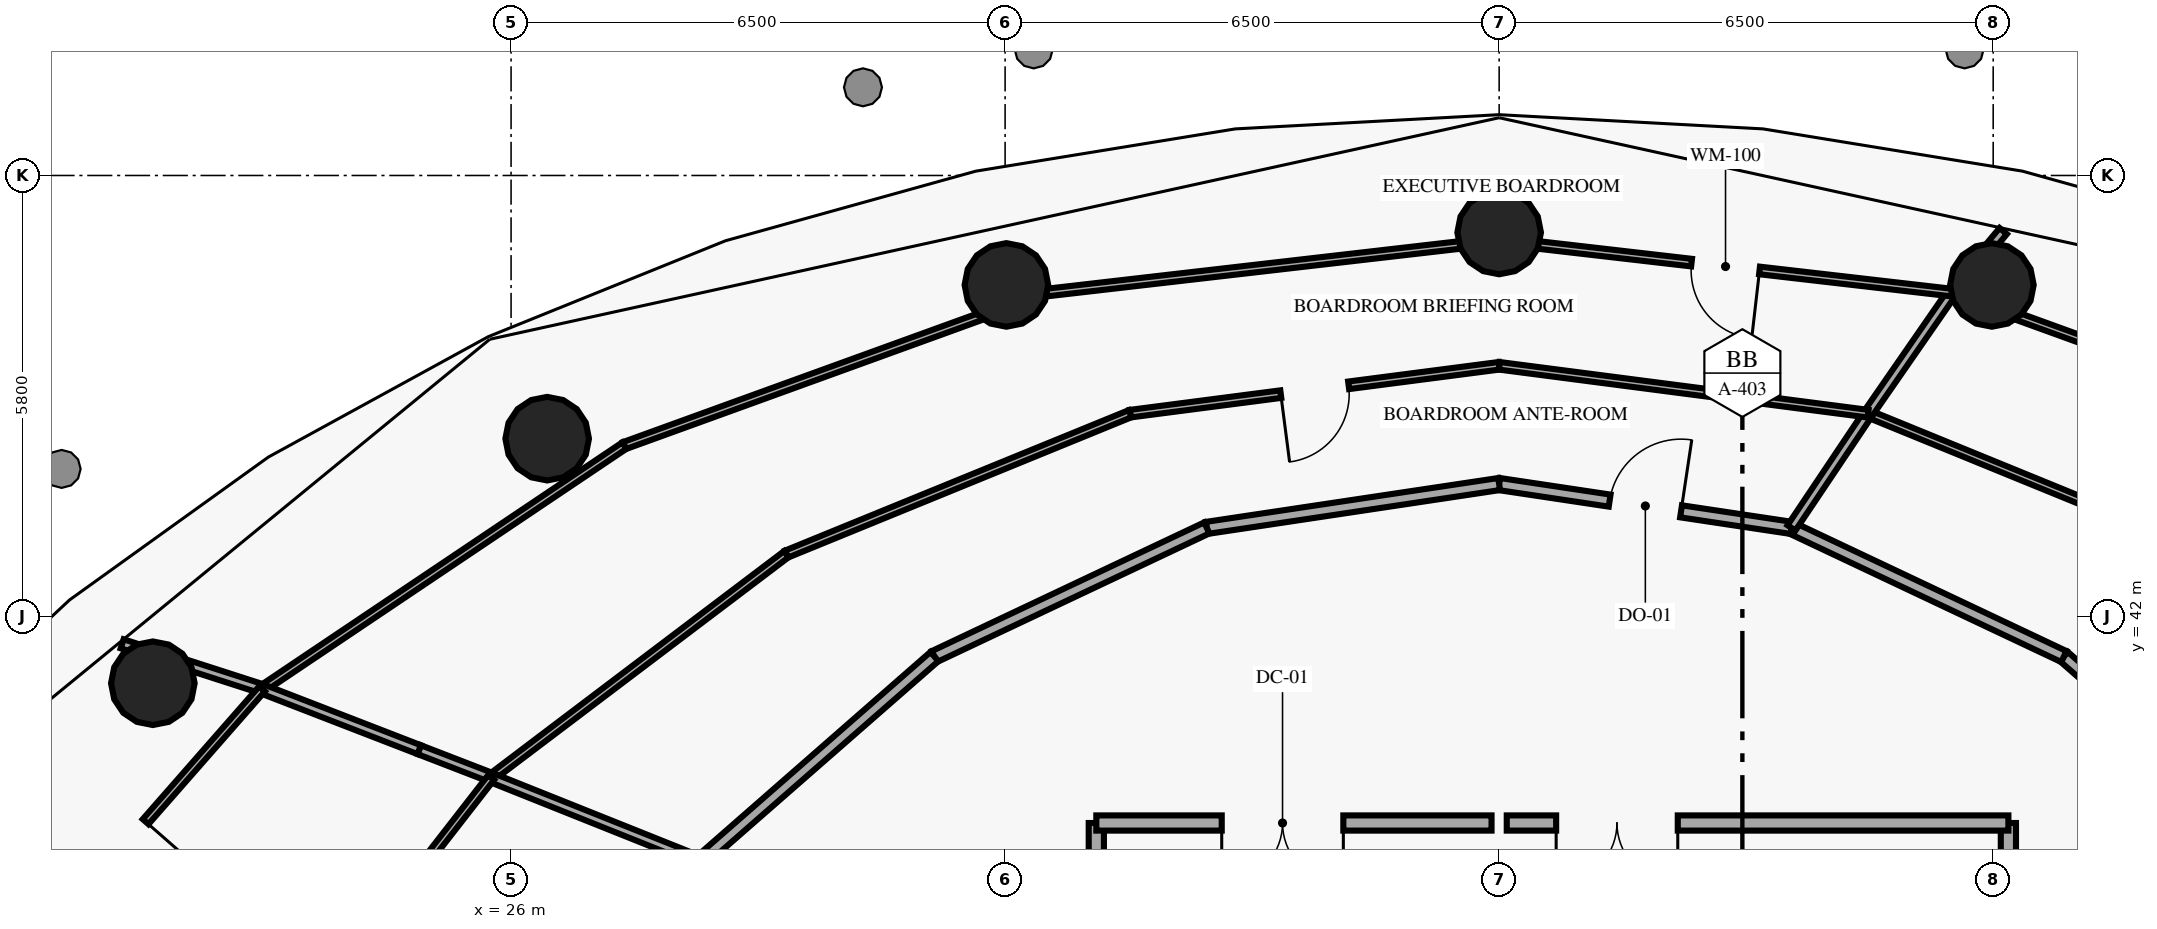
"""IFC4 building model, lengths in metres.
Left out: names, types, materials, properties, quantities, classifications, styles, units other than length and angle.
Written with IfcOpenShell. Run it as: python <this file> out.ifc"""

import sys

from ifc_helpers import new_model, si_unit, direction, frame, frame_2d, origin, origin_2d, place, context, subcontext, project, spatial, rectangle, circle, extrude, element, fill, save


model = new_model("IFC4")
c1 = context("Model", 3, precision=1e-05, world=origin(), true_north=direction((0.0, 1.0)))
c2 = subcontext(c1, "Body", "Model", "MODEL_VIEW")
j1 = project(units=[si_unit("LENGTHUNIT", "METRE"), si_unit("PLANEANGLEUNIT", "RADIAN")], contexts=[c1])
p1 = place(None, origin())
s1 = spatial("IfcSite", under=j1, at=p1, CompositionType="ELEMENT")
p2 = place(p1, origin())
s2 = spatial("IfcBuilding", under=s1, at=p2, CompositionType="ELEMENT")
p3 = place(p2, frame((0.0, 0.0, 102.0)))
s3 = spatial("IfcBuildingStorey", under=s2, at=p3, CompositionType="ELEMENT", Elevation=102.0)
for number, where, z_axis, x_axis in (
    (1, (45.483, 46.36, 0.0), (0.0, 0.0, 1.0), (1.0, 0.0, 0.0)),
    (2, (39.0, 47.05, 0.0), (0.0, 0.0, 1.0), (1.0, 0.0, 0.0)),
    (3, (32.517, 46.36, 0.0), (0.0, 0.0, 1.0), (1.0, 0.0, 0.0)),
    (4, (26.475, 44.337, 0.0), (0.0, 0.0, 1.0), (1.0, 0.0, 0.0)),
    (5, (21.287, 41.119, 0.0), (0.0, 0.0, 1.0), (1.0, 0.0, 0.0)),
):
    element("IfcColumn", number, at=place(p3, frame(where, z_axis=z_axis, x_axis=x_axis)), inside=s3, PredefinedType="COLUMN", context=c2, shape_type="SweptSolid", body=[
        extrude(circle(Radius=0.55, at=origin_2d()), origin(), (0.0, 0.0, 1.0), 3.7),
    ])
for number, where, z_axis, x_axis in (
    (6, (33.7, 37.4, 0.0), (0.0, 0.0, 1.0), (0.0, 1.0, 0.0)),
    (7, (45.7, 37.4, 0.0), (0.0, 0.0, 1.0), (0.0, 1.0, 0.0)),
):
    element("IfcWall", number, at=place(p3, frame(where, z_axis=z_axis, x_axis=x_axis)), inside=s3, PredefinedType="SOLIDWALL", context=c2, shape_type="SweptSolid", body=[
        extrude(rectangle(XDim=1.88, YDim=0.2, at=frame_2d((0.94, 0.0))), origin(), (0.0, 0.0, 1.0), 3.7),
    ])
p4 = place(p3, frame((38.9, 39.28, 0.0), z_axis=(0.0, 0.0, 1.0), x_axis=(-1.0, 0.0, 0.0)))
e8 = element("IfcWall", 8, at=p4, inside=s3, PredefinedType="SOLIDWALL", context=c2, shape_type="SweptSolid", body=[
    extrude(rectangle(XDim=5.2, YDim=0.2, at=frame_2d((2.6, 0.0))), origin(), (0.0, 0.0, 1.0), 3.7),
])
p5 = place(p4, frame((1.95, 0.0, 0.0)))
e9 = element("IfcOpeningElement", 9, at=p5, cuts=e8, PredefinedType="OPENING", context=c2, shape_type="SweptSolid", body=[
    extrude(rectangle(XDim=1.6, YDim=2.2, at=frame_2d((0.8, 1.1))), frame((0.0, 0.11, 0.0), z_axis=(0.0, -1.0, 0.0), x_axis=(1.0, 0.0, 0.0)), (0.0, 0.0, 1.0), 0.22),
])
p6 = place(p3, frame((45.7, 39.28, 0.0), z_axis=(0.0, 0.0, 1.0), x_axis=(-1.0, 0.0, 0.0)))
e10 = element("IfcWall", 10, at=p6, inside=s3, PredefinedType="SOLIDWALL", context=c2, shape_type="SweptSolid", body=[
    extrude(rectangle(XDim=6.6, YDim=0.2, at=frame_2d((3.3, 0.0))), origin(), (0.0, 0.0, 1.0), 3.7),
])
p7 = place(p6, frame((4.35, 0.0, 0.0)))
e11 = element("IfcOpeningElement", 11, at=p7, cuts=e10, PredefinedType="OPENING", context=c2, shape_type="SweptSolid", body=[
    extrude(rectangle(XDim=1.6, YDim=2.2, at=frame_2d((0.8, 1.1))), frame((0.0, 0.11, 0.0), z_axis=(0.0, -1.0, 0.0), x_axis=(1.0, 0.0, 0.0)), (0.0, 0.0, 1.0), 0.22),
])
p8 = place(p3, frame((49.508, 38.778, 0.0), z_axis=(0.0, 0.0, 1.0), x_axis=(-0.75275419575, 0.658301694348, 0.0)))
e12 = element("IfcWall", 12, at=p8, inside=s3, PredefinedType="PARTITIONING", context=c2, shape_type="SweptSolid", body=[
    extrude(rectangle(XDim=4.089, YDim=0.16, at=frame_2d((2.044, 0.0))), origin(), (0.0, 0.0, 1.0), 3.7),
])
p9 = place(p3, frame((46.43, 41.47, 0.0), z_axis=(0.0, 0.0, 1.0), x_axis=(-0.904182574226, 0.427146195658, 0.0)))
e13 = element("IfcWall", 13, at=p9, inside=s3, PredefinedType="PARTITIONING", context=c2, shape_type="SweptSolid", body=[
    extrude(rectangle(XDim=3.964, YDim=0.16, at=frame_2d((1.982, 0.0))), origin(), (0.0, 0.0, 1.0), 3.7),
])
p10 = place(p3, frame((39.0, 43.74, 0.0), z_axis=(0.0, 0.0, 1.0), x_axis=(0.988935892392, -0.14834352274, 0.0)))
e14 = element("IfcWall", 14, at=p10, inside=s3, PredefinedType="PARTITIONING", context=c2, shape_type="SweptSolid", body=[
    extrude(rectangle(XDim=3.889, YDim=0.16, at=frame_2d((1.944, 0.0))), origin(), (0.0, 0.0, 1.0), 3.7),
])
p11 = place(p10, frame((1.47, 0.0, 0.0)))
e15 = element("IfcOpeningElement", 15, at=p11, cuts=e14, PredefinedType="OPENING", context=c2, shape_type="SweptSolid", body=[
    extrude(rectangle(XDim=0.95, YDim=2.15, at=frame_2d((0.475, 1.075))), frame((0.0, 0.09, 0.0), z_axis=(0.0, -1.0, 0.0), x_axis=(1.0, 0.0, 0.0)), (0.0, 0.0, 1.0), 0.18),
])
p12 = place(p3, frame((39.0, 43.74, 0.0), z_axis=(0.0, 0.0, 1.0), x_axis=(-0.988935892392, -0.14834352274, 0.0)))
e16 = element("IfcWall", 16, at=p12, inside=s3, PredefinedType="PARTITIONING", context=c2, shape_type="SweptSolid", body=[
    extrude(rectangle(XDim=3.889, YDim=0.16, at=frame_2d((1.944, 0.0))), origin(), (0.0, 0.0, 1.0), 3.7),
])
p13 = place(p3, frame((35.154, 43.163, 0.0), z_axis=(0.0, 0.0, 1.0), x_axis=(-0.904182574226, -0.427146195658, 0.0)))
e17 = element("IfcWall", 17, at=p13, inside=s3, PredefinedType="PARTITIONING", context=c2, shape_type="SweptSolid", body=[
    extrude(rectangle(XDim=3.964, YDim=0.16, at=frame_2d((1.982, 0.0))), origin(), (0.0, 0.0, 1.0), 3.7),
])
p14 = place(p3, frame((31.57, 41.47, 0.0), z_axis=(0.0, 0.0, 1.0), x_axis=(-0.75275419575, -0.658301694348, 0.0)))
e18 = element("IfcWall", 18, at=p14, inside=s3, PredefinedType="PARTITIONING", context=c2, shape_type="SweptSolid", body=[
    extrude(rectangle(XDim=4.089, YDim=0.16, at=frame_2d((2.044, 0.0))), origin(), (0.0, 0.0, 1.0), 3.7),
])
p15 = place(p3, frame((48.377, 42.818, 0.0), z_axis=(0.0, 0.0, 1.0), x_axis=(-0.925718788243, 0.378212539577, 0.0)))
e19 = element("IfcWall", 19, at=p15, inside=s3, PredefinedType="MOVABLE", context=c2, shape_type="SweptSolid", body=[
    extrude(rectangle(XDim=4.886, YDim=0.1, at=frame_2d((2.443, 0.0))), origin(), (0.0, 0.0, 1.0), 3.7),
])
p16 = place(p3, frame((50.509, 44.246, 0.0), z_axis=(0.0, 0.0, 1.0), x_axis=(-0.940117685929, 0.340850020689, 0.0)))
e20 = element("IfcWall", 20, at=p16, inside=s3, PredefinedType="MOVABLE", context=c2, shape_type="SweptSolid", body=[
    extrude(rectangle(XDim=5.906, YDim=0.1, at=frame_2d((2.953, 0.0))), origin(), (0.0, 0.0, 1.0), 3.7),
])
p17 = place(p3, frame((42.846, 43.163, 0.0), z_axis=(0.0, 0.0, 1.0), x_axis=(0.557032949089, 0.83049039346, 0.0)))
e21 = element("IfcWall", 21, at=p17, inside=s3, PredefinedType="PARTITIONING", context=c2, shape_type="SweptSolid", body=[
    extrude(rectangle(XDim=1.81, YDim=0.125, at=frame_2d((0.905, 0.0))), origin(), (0.0, 0.0, 1.0), 3.7),
])
p18 = place(p3, frame((43.854, 44.666, 0.0), z_axis=(0.0, 0.0, 1.0), x_axis=(0.569268945464, 0.822151365461, 0.0)))
e22 = element("IfcWall", 22, at=p18, inside=s3, PredefinedType="PARTITIONING", context=c2, shape_type="SweptSolid", body=[
    extrude(rectangle(XDim=1.938, YDim=0.125, at=frame_2d((0.969, 0.0))), origin(), (0.0, 0.0, 1.0), 3.7),
])
p19 = place(p3, frame((44.957, 46.259, 0.0), z_axis=(0.0, 0.0, 1.0), x_axis=(0.640184399664, 0.768221279597, 0.0)))
e23 = element("IfcWall", 23, at=p19, inside=s3, PredefinedType="PARTITIONING", context=c2, shape_type="SweptSolid", body=[
    extrude(rectangle(XDim=1.054, YDim=0.125, at=frame_2d((0.527, 0.0))), origin(), (0.0, 0.0, 1.0), 3.7),
])
p20 = place(p3, frame((43.854, 44.666, 0.0), z_axis=(0.0, 0.0, 1.0), x_axis=(-0.991685305255, 0.128686655646, 0.0)))
e24 = element("IfcWall", 24, at=p20, inside=s3, PredefinedType="MOVABLE", context=c2, shape_type="SweptSolid", body=[
    extrude(rectangle(XDim=4.895, YDim=0.1, at=frame_2d((2.447, 0.0))), origin(), (0.0, 0.0, 1.0), 3.7),
])
p21 = place(p3, frame((39.0, 45.296, 0.0), z_axis=(0.0, 0.0, 1.0), x_axis=(-0.991685305255, -0.128686655646, 0.0)))
e25 = element("IfcWall", 25, at=p21, inside=s3, PredefinedType="MOVABLE", context=c2, shape_type="SweptSolid", body=[
    extrude(rectangle(XDim=4.895, YDim=0.1, at=frame_2d((2.447, 0.0))), origin(), (0.0, 0.0, 1.0), 3.7),
])
p22 = place(p21, frame((1.997, 0.0, 0.0)))
e26 = element("IfcOpeningElement", 26, at=p22, cuts=e25, PredefinedType="OPENING", context=c2, shape_type="SweptSolid", body=[
    extrude(rectangle(XDim=0.9, YDim=2.1, at=frame_2d((0.45, 1.05))), frame((0.0, 0.06, 0.0), z_axis=(0.0, -1.0, 0.0), x_axis=(1.0, 0.0, 0.0)), (0.0, 0.0, 1.0), 0.12),
])
p23 = place(p3, frame((34.146, 44.666, 0.0), z_axis=(0.0, 0.0, 1.0), x_axis=(-0.925718788243, -0.378212539577, 0.0)))
e27 = element("IfcWall", 27, at=p23, inside=s3, PredefinedType="MOVABLE", context=c2, shape_type="SweptSolid", body=[
    extrude(rectangle(XDim=4.886, YDim=0.1, at=frame_2d((2.443, 0.0))), origin(), (0.0, 0.0, 1.0), 3.7),
])
p24 = place(p3, frame((29.623, 42.818, 0.0), z_axis=(0.0, 0.0, 1.0), x_axis=(-0.797485241188, -0.60333845401, 0.0)))
e28 = element("IfcWall", 28, at=p24, inside=s3, PredefinedType="MOVABLE", context=c2, shape_type="SweptSolid", body=[
    extrude(rectangle(XDim=4.872, YDim=0.1, at=frame_2d((2.436, 0.0))), origin(), (0.0, 0.0, 1.0), 3.7),
])
p25 = place(p3, frame((44.957, 46.259, 0.0), z_axis=(0.0, 0.0, 1.0), x_axis=(-0.993433875949, 0.114407753747, 0.0)))
e29 = element("IfcWall", 29, at=p25, inside=s3, PredefinedType="MOVABLE", context=c2, shape_type="SweptSolid", body=[
    extrude(rectangle(XDim=5.996, YDim=0.1, at=frame_2d((2.998, 0.0))), origin(), (0.0, 0.0, 1.0), 3.005),
])
p26 = place(p25, frame((2.548, 0.0, 0.0)))
e30 = element("IfcOpeningElement", 30, at=p26, cuts=e29, PredefinedType="OPENING", context=c2, shape_type="SweptSolid", body=[
    extrude(rectangle(XDim=0.9, YDim=2.1, at=frame_2d((0.45, 1.05))), frame((0.0, 0.06, 0.0), z_axis=(0.0, -1.0, 0.0), x_axis=(1.0, 0.0, 0.0)), (0.0, 0.0, 1.0), 0.12),
])
p27 = place(p3, frame((39.0, 46.945, 0.0), z_axis=(0.0, 0.0, 1.0), x_axis=(-0.993433875949, -0.114407753747, 0.0)))
e31 = element("IfcWall", 31, at=p27, inside=s3, PredefinedType="MOVABLE", context=c2, shape_type="SweptSolid", body=[
    extrude(rectangle(XDim=5.996, YDim=0.1, at=frame_2d((2.998, 0.0))), origin(), (0.0, 0.0, 1.0), 3.005),
])
p28 = place(p3, frame((33.043, 46.259, 0.0), z_axis=(0.0, 0.0, 1.0), x_axis=(-0.940117685929, -0.340850020689, 0.0)))
e32 = element("IfcWall", 32, at=p28, inside=s3, PredefinedType="MOVABLE", context=c2, shape_type="SweptSolid", body=[
    extrude(rectangle(XDim=5.906, YDim=0.1, at=frame_2d((2.953, 0.0))), origin(), (0.0, 0.0, 1.0), 3.7),
])
p29 = place(p3, frame((27.491, 44.246, 0.0), z_axis=(0.0, 0.0, 1.0), x_axis=(-0.830174745772, -0.557503265893, 0.0)))
e33 = element("IfcWall", 33, at=p29, inside=s3, PredefinedType="MOVABLE", context=c2, shape_type="SweptSolid", body=[
    extrude(rectangle(XDim=5.742, YDim=0.1, at=frame_2d((2.871, 0.0))), origin(), (0.0, 0.0, 1.0), 3.7),
])
p30 = place(p3, frame((28.492, 38.778, 0.0), z_axis=(0.0, 0.0, 1.0), x_axis=(-0.928561824385, 0.371177771822, 0.0)))
e34 = element("IfcWall", 34, at=p30, inside=s3, PredefinedType="PARTITIONING", context=c2, shape_type="SweptSolid", body=[
    extrude(rectangle(XDim=2.966, YDim=0.125, at=frame_2d((1.483, 0.0))), origin(), (0.0, 0.0, 1.0), 2.92),
])
p31 = place(p3, frame((25.738, 39.879, 0.0), z_axis=(0.0, 0.0, 1.0), x_axis=(-0.932693379072, 0.360670293531, 0.0)))
e35 = element("IfcWall", 35, at=p31, inside=s3, PredefinedType="PARTITIONING", context=c2, shape_type="SweptSolid", body=[
    extrude(rectangle(XDim=1.015, YDim=0.125, at=frame_2d((0.508, 0.0))), origin(), (0.0, 0.0, 1.0), 2.92),
])
p32 = place(p3, frame((24.791, 40.245, 0.0), z_axis=(0.0, 0.0, 1.0), x_axis=(-0.932611158557, 0.360882843779, 0.0)))
e36 = element("IfcWall", 36, at=p32, inside=s3, PredefinedType="PARTITIONING", context=c2, shape_type="SweptSolid", body=[
    extrude(rectangle(XDim=2.216, YDim=0.125, at=frame_2d((1.108, 0.0))), origin(), (0.0, 0.0, 1.0), 3.7),
])
p33 = place(p3, frame((22.724, 41.045, 0.0), z_axis=(0.0, 0.0, 1.0), x_axis=(-0.951840581079, 0.306593392314, 0.0)))
e37 = element("IfcWall", 37, at=p33, inside=s3, PredefinedType="PARTITIONING", context=c2, shape_type="SweptSolid", body=[
    extrude(rectangle(XDim=1.934, YDim=0.125, at=frame_2d((0.967, 0.0))), origin(), (0.0, 0.0, 1.0), 3.7),
])
p34 = place(p3, frame((25.738, 39.879, 0.0), z_axis=(0.0, 0.0, 1.0), x_axis=(-0.613999814684, -0.789306168459, 0.0)))
e38 = element("IfcWall", 38, at=p34, inside=s3, PredefinedType="MOVABLE", context=c2, shape_type="SweptSolid", body=[
    extrude(rectangle(XDim=4.853, YDim=0.1, at=frame_2d((2.427, 0.0))), origin(), (0.0, 0.0, 1.0), 3.7),
])
p35 = place(p3, frame((22.724, 41.045, 0.0), z_axis=(0.0, 0.0, 1.0), x_axis=(-0.659301696391, -0.751878496258, 0.0)))
e39 = element("IfcWall", 39, at=p35, inside=s3, PredefinedType="MOVABLE", context=c2, shape_type="SweptSolid", body=[
    extrude(rectangle(XDim=5.549, YDim=0.1, at=frame_2d((2.774, 0.0))), origin(), (0.0, 0.0, 1.0), 3.7),
])
p36 = place(p35, frame((2.324, 0.0, 0.0)))
e40 = element("IfcOpeningElement", 40, at=p36, cuts=e39, PredefinedType="OPENING", context=c2, shape_type="SweptSolid", body=[
    extrude(rectangle(XDim=0.9, YDim=2.1, at=frame_2d((0.45, 1.05))), frame((0.0, 0.06, 0.0), z_axis=(0.0, -1.0, 0.0), x_axis=(1.0, 0.0, 0.0)), (0.0, 0.0, 1.0), 0.12),
])
p37 = place(p5, origin())
e41 = element("IfcDoor", 41, at=p37, inside=s3, OperationType="DOUBLE_DOOR_SINGLE_SWING", PredefinedType="DOOR", context=c2, shape_type="SweptSolid", body=[
    extrude(rectangle(XDim=1.6, YDim=2.2, at=frame_2d((0.8, 1.1))), frame((0.0, 0.025, 0.0), z_axis=(0.0, -1.0, 0.0), x_axis=(1.0, 0.0, 0.0)), (0.0, 0.0, 1.0), 0.05),
])
fill(e9, e41)
p38 = place(p7, origin())
e42 = element("IfcDoor", 42, at=p38, inside=s3, OperationType="DOUBLE_DOOR_SINGLE_SWING", PredefinedType="DOOR", context=c2, shape_type="SweptSolid", body=[
    extrude(rectangle(XDim=1.6, YDim=2.2, at=frame_2d((0.8, 1.1))), frame((0.0, 0.025, 0.0), z_axis=(0.0, -1.0, 0.0), x_axis=(1.0, 0.0, 0.0)), (0.0, 0.0, 1.0), 0.05),
])
fill(e11, e42)
p39 = place(p11, origin())
e43 = element("IfcDoor", 43, at=p39, inside=s3, OperationType="SINGLE_SWING_RIGHT", PredefinedType="DOOR", context=c2, shape_type="SweptSolid", body=[
    extrude(rectangle(XDim=0.95, YDim=2.15, at=frame_2d((0.475, 1.075))), frame((0.0, 0.025, 0.0), z_axis=(0.0, -1.0, 0.0), x_axis=(1.0, 0.0, 0.0)), (0.0, 0.0, 1.0), 0.05),
])
fill(e15, e43)
p40 = place(p22, origin())
e44 = element("IfcDoor", 44, at=p40, inside=s3, OperationType="SINGLE_SWING_RIGHT", PredefinedType="DOOR", context=c2, shape_type="SweptSolid", body=[
    extrude(rectangle(XDim=0.9, YDim=2.1, at=frame_2d((0.45, 1.05))), frame((0.0, 0.025, 0.0), z_axis=(0.0, -1.0, 0.0), x_axis=(1.0, 0.0, 0.0)), (0.0, 0.0, 1.0), 0.05),
])
fill(e26, e44)
p41 = place(p26, origin())
e45 = element("IfcDoor", 45, at=p41, inside=s3, OperationType="SINGLE_SWING_LEFT", PredefinedType="DOOR", context=c2, shape_type="SweptSolid", body=[
    extrude(rectangle(XDim=0.9, YDim=2.1, at=frame_2d((0.45, 1.05))), frame((0.0, 0.025, 0.0), z_axis=(0.0, -1.0, 0.0), x_axis=(1.0, 0.0, 0.0)), (0.0, 0.0, 1.0), 0.05),
])
fill(e30, e45)
p42 = place(p36, origin())
e46 = element("IfcDoor", 46, at=p42, inside=s3, OperationType="SINGLE_SWING_LEFT", PredefinedType="DOOR", context=c2, shape_type="SweptSolid", body=[
    extrude(rectangle(XDim=0.9, YDim=2.1, at=frame_2d((0.45, 1.05))), frame((0.0, 0.025, 0.0), z_axis=(0.0, -1.0, 0.0), x_axis=(1.0, 0.0, 0.0)), (0.0, 0.0, 1.0), 0.05),
])
fill(e40, e46)
save(model, sys.argv[1])
